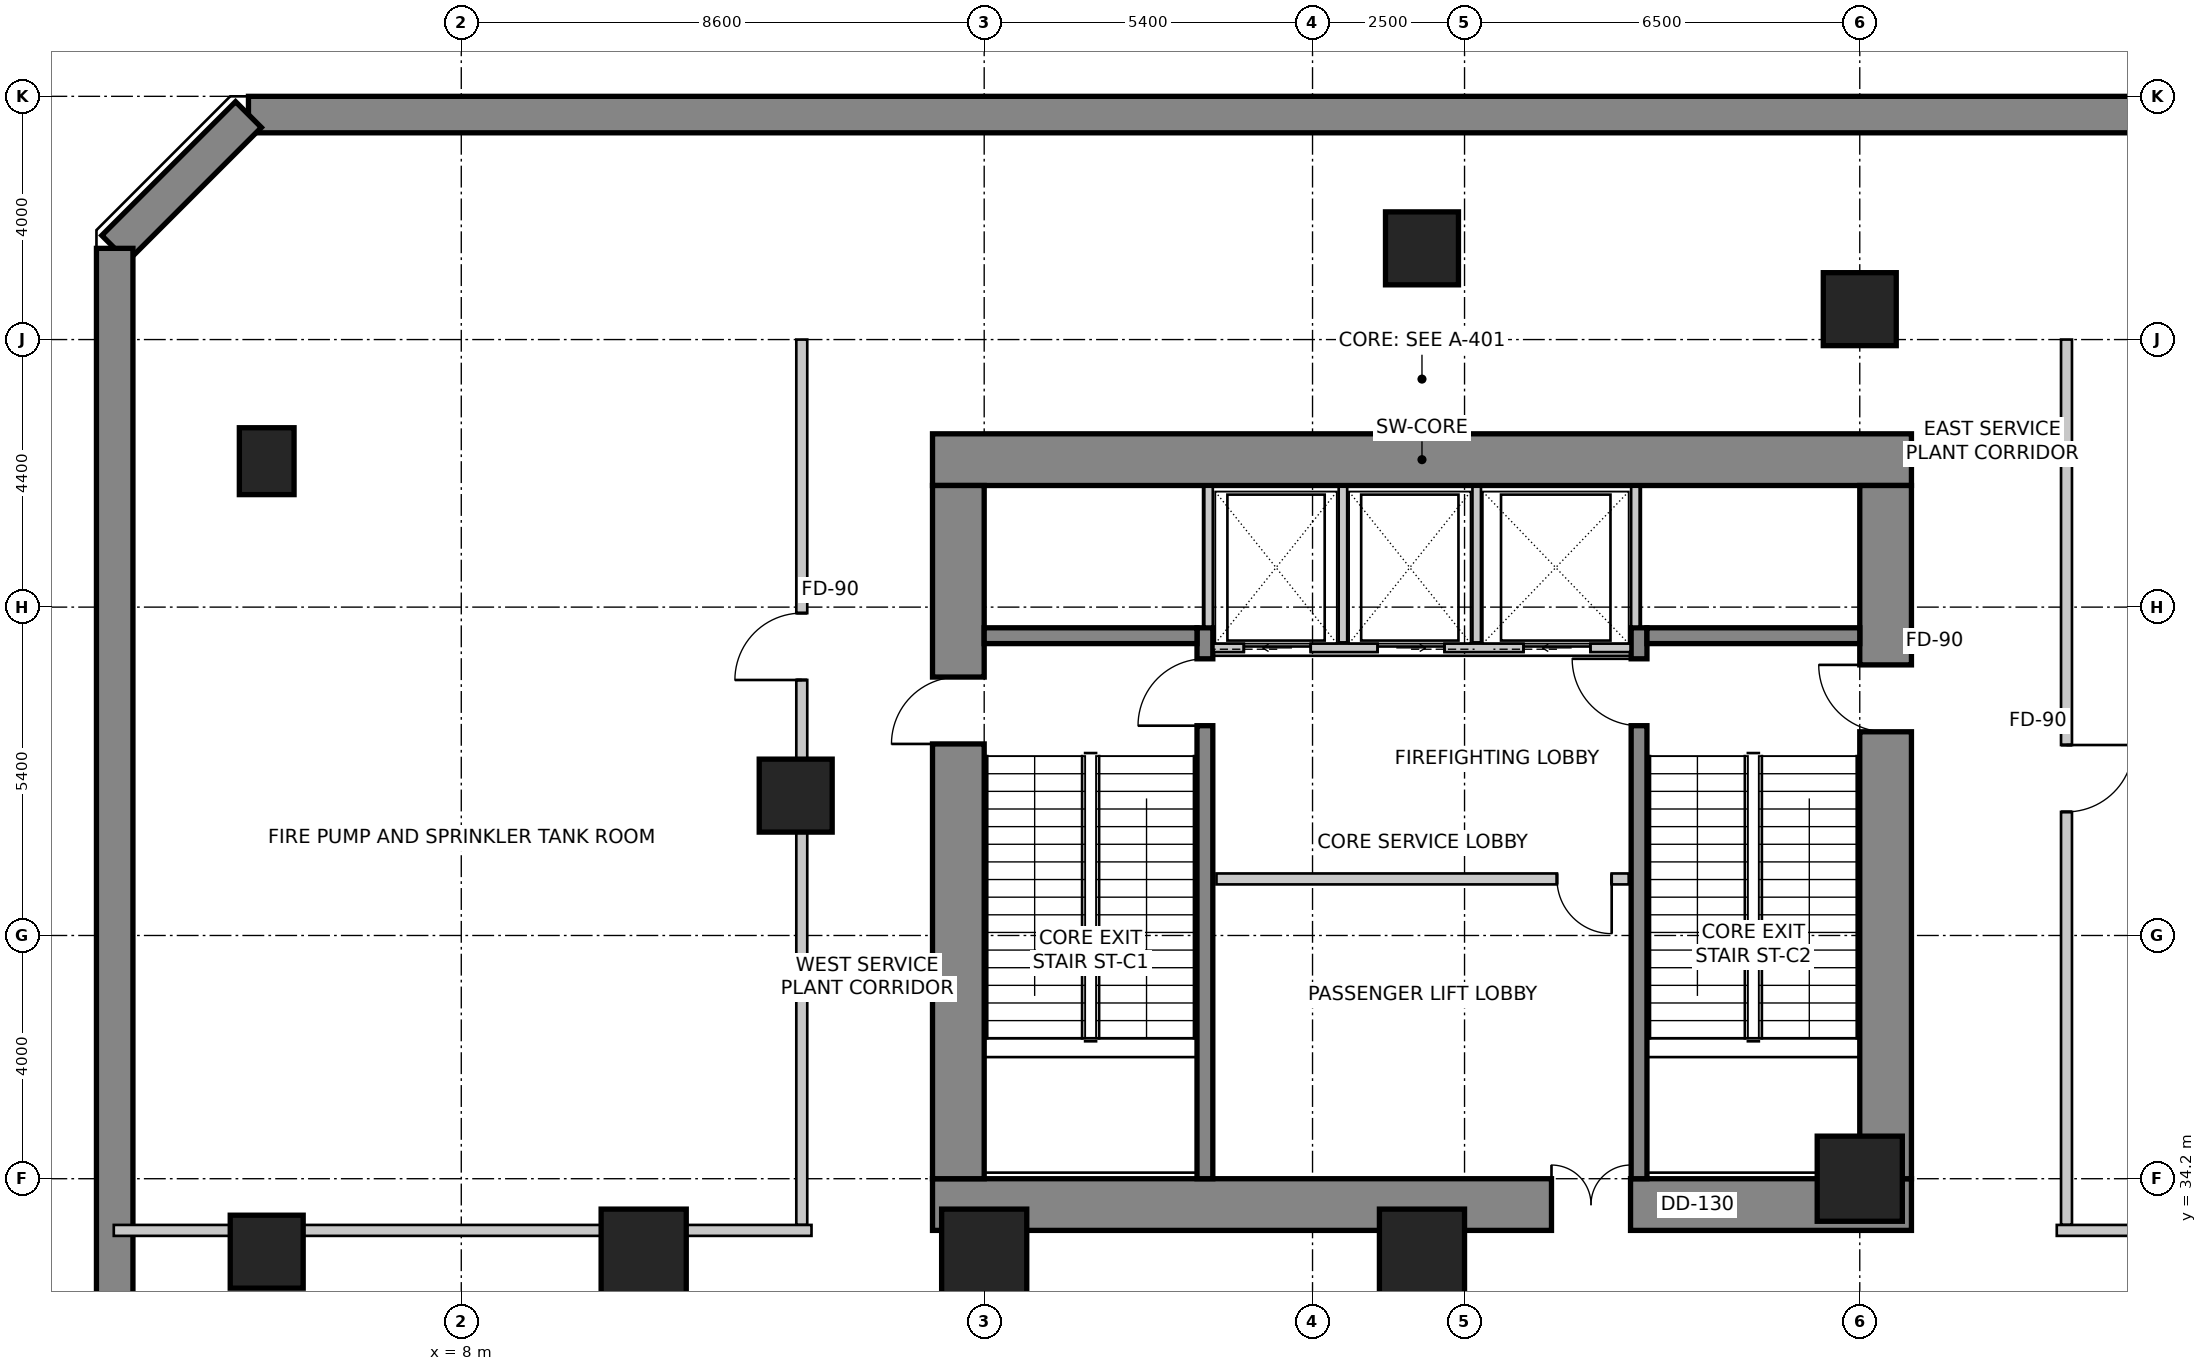
"""IFC4 building model, lengths in metres.
Left out: names, types, materials, properties, quantities, classifications, styles, units other than length and angle.
Written with IfcOpenShell. Run it as: python <this file> out.ifc"""

import sys

from ifc_helpers import new_model, si_unit, direction, frame, frame_2d, origin, origin_2d, place, context, subcontext, project, spatial, rectangle, extrude, source, transform, mapped, element, fill, save


model = new_model("IFC4")
c1 = context("Model", 3, precision=1e-05, world=origin(), true_north=direction((0.0, 1.0)))
c2 = subcontext(c1, "Body", "Model", "MODEL_VIEW")
j1 = project(units=[si_unit("LENGTHUNIT", "METRE"), si_unit("PLANEANGLEUNIT", "RADIAN")], contexts=[c1])
p1 = place(None, origin())
s1 = spatial("IfcSite", under=j1, at=p1, CompositionType="ELEMENT")
p2 = place(p1, origin())
s2 = spatial("IfcBuilding", under=s1, at=p2, CompositionType="ELEMENT")
p3 = place(p2, frame((0.0, 0.0, -11.2)))
s3 = spatial("IfcBuildingStorey", under=s2, at=p3, CompositionType="ELEMENT", Elevation=-11.2)
p4 = place(p3, frame((15.75, 46.025, 0.0), z_axis=(0.0, 0.0, 1.0), x_axis=(1.0, 0.0, 0.0)))
e1 = element("IfcWall", 1, at=p4, inside=s3, PredefinedType="SHEAR", context=c2, shape_type="SweptSolid", body=[
    extrude(rectangle(XDim=16.1, YDim=0.85, at=frame_2d((8.05, 0.0))), origin(), (0.0, 0.0, 1.0), 5.8),
])
p5 = place(p3, frame((15.75, 33.775, 0.0), z_axis=(0.0, 0.0, 1.0), x_axis=(1.0, 0.0, 0.0)))
e2 = element("IfcWall", 2, at=p5, inside=s3, PredefinedType="SHEAR", context=c2, shape_type="SweptSolid", body=[
    extrude(rectangle(XDim=16.1, YDim=0.85, at=frame_2d((8.05, 0.0))), origin(), (0.0, 0.0, 1.0), 5.8),
])
m1 = source(origin(), c2, "Body", "SweptSolid", [
    extrude(rectangle(XDim=1.3, YDim=2.15, at=frame_2d((0.65, 1.075))), frame((0.0, 0.435, 0.0), z_axis=(0.0, -1.0, 0.0), x_axis=(1.0, 0.0, 0.0)), (0.0, 0.0, 1.0), 0.87),
])
p6 = place(p5, frame((10.18, 0.0, 0.0)))
e3 = element("IfcOpeningElement", 3, at=p6, cuts=e2, PredefinedType="OPENING", context=c2, shape_type="MappedRepresentation", body=[
    mapped(m1, transform((0.0, 0.0, 0.0), scale=1.0)),
])
p7 = place(p3, frame((16.175, 34.2, 0.0), z_axis=(0.0, 0.0, 1.0), x_axis=(0.0, 1.0, 0.0)))
e4 = element("IfcWall", 4, at=p7, inside=s3, PredefinedType="SHEAR", context=c2, shape_type="SweptSolid", body=[
    extrude(rectangle(XDim=11.4, YDim=0.85, at=frame_2d((5.7, 0.0))), origin(), (0.0, 0.0, 1.0), 5.8),
])
m2 = source(origin(), c2, "Body", "SweptSolid", [
    extrude(rectangle(XDim=1.1, YDim=2.15, at=frame_2d((0.55, 1.075))), frame((0.0, 0.435, 0.0), z_axis=(0.0, -1.0, 0.0), x_axis=(1.0, 0.0, 0.0)), (0.0, 0.0, 1.0), 0.87),
])
p8 = place(p7, frame((7.15, 0.0, 0.0)))
e5 = element("IfcOpeningElement", 5, at=p8, cuts=e4, PredefinedType="OPENING", context=c2, shape_type="MappedRepresentation", body=[
    mapped(m2, transform((0.0, 0.0, 0.0), scale=1.0)),
])
p9 = place(p3, frame((31.425, 34.2, 0.0), z_axis=(0.0, 0.0, 1.0), x_axis=(0.0, 1.0, 0.0)))
e6 = element("IfcWall", 6, at=p9, inside=s3, PredefinedType="SHEAR", context=c2, shape_type="SweptSolid", body=[
    extrude(rectangle(XDim=11.4, YDim=0.85, at=frame_2d((5.7, 0.0))), origin(), (0.0, 0.0, 1.0), 5.8),
])
p10 = place(p9, frame((7.35, 0.0, 0.0)))
e7 = element("IfcOpeningElement", 7, at=p10, cuts=e6, PredefinedType="OPENING", context=c2, shape_type="MappedRepresentation", body=[
    mapped(m2, transform((0.0, 0.0, 0.0), scale=1.0)),
])
p11 = place(p3, frame((20.23, 34.2, 0.0), z_axis=(0.0, 0.0, 1.0), x_axis=(0.0, 1.0, 0.0)))
e8 = element("IfcWall", 8, at=p11, inside=s3, PredefinedType="SHEAR", context=c2, shape_type="SweptSolid", body=[
    extrude(rectangle(XDim=9.06, YDim=0.26, at=frame_2d((4.53, 0.0))), origin(), (0.0, 0.0, 1.0), 5.8),
])
m3 = source(origin(), c2, "Body", "SweptSolid", [
    extrude(rectangle(XDim=1.1, YDim=2.15, at=frame_2d((0.55, 1.075))), frame((0.0, 0.14, 0.0), z_axis=(0.0, -1.0, 0.0), x_axis=(1.0, 0.0, 0.0)), (0.0, 0.0, 1.0), 0.28),
])
p12 = place(p11, frame((7.45, 0.0, 0.0)))
e9 = element("IfcOpeningElement", 9, at=p12, cuts=e8, PredefinedType="OPENING", context=c2, shape_type="MappedRepresentation", body=[
    mapped(m3, transform((0.0, 0.0, 0.0), scale=1.0)),
])
p13 = place(p3, frame((27.37, 34.2, 0.0), z_axis=(0.0, 0.0, 1.0), x_axis=(0.0, 1.0, 0.0)))
e10 = element("IfcWall", 10, at=p13, inside=s3, PredefinedType="SHEAR", context=c2, shape_type="SweptSolid", body=[
    extrude(rectangle(XDim=9.06, YDim=0.26, at=frame_2d((4.53, 0.0))), origin(), (0.0, 0.0, 1.0), 5.8),
])
p14 = place(p13, frame((7.45, 0.0, 0.0)))
e11 = element("IfcOpeningElement", 11, at=p14, cuts=e10, PredefinedType="OPENING", context=c2, shape_type="MappedRepresentation", body=[
    mapped(m3, transform((0.0, 0.0, 0.0), scale=1.0)),
])
for number, where, z_axis, x_axis in (
    (12, (16.6, 43.13, 0.0), (0.0, 0.0, 1.0), (1.0, 0.0, 0.0)),
    (13, (27.5, 43.13, 0.0), (0.0, 0.0, 1.0), (1.0, 0.0, 0.0)),
):
    element("IfcWall", number, at=place(p3, frame(where, z_axis=z_axis, x_axis=x_axis)), inside=s3, PredefinedType="SHEAR", context=c2, shape_type="SweptSolid", body=[
        extrude(rectangle(XDim=3.5, YDim=0.26, at=frame_2d((1.75, 0.0))), origin(), (0.0, 0.0, 1.0), 5.8),
    ])
p15 = place(p3, frame((65.5, 51.7, 0.0), z_axis=(0.0, 0.0, 1.0), x_axis=(-1.0, 0.0, 0.0)))
e14 = element("IfcWall", 14, at=p15, inside=s3, PredefinedType="SHEAR", context=c2, shape_type="SweptSolid", body=[
    extrude(rectangle(XDim=61.0, YDim=0.6, at=frame_2d((30.5, 0.0))), origin(), (0.0, 0.0, 1.0), 5.8),
])
p16 = place(p3, frame((4.5, 51.7, 0.0), z_axis=(0.0, 0.0, 1.0), x_axis=(-0.707106781187, -0.707106781187, 0.0)))
e15 = element("IfcWall", 15, at=p16, inside=s3, PredefinedType="SHEAR", context=c2, shape_type="SweptSolid", body=[
    extrude(rectangle(XDim=3.111, YDim=0.6, at=frame_2d((1.556, 0.0))), origin(), (0.0, 0.0, 1.0), 5.8),
])
p17 = place(p3, frame((2.3, 49.5, 0.0), z_axis=(0.0, 0.0, 1.0), x_axis=(0.0, -1.0, 0.0)))
e16 = element("IfcWall", 16, at=p17, inside=s3, PredefinedType="SHEAR", context=c2, shape_type="SweptSolid", body=[
    extrude(rectangle(XDim=45.0, YDim=0.6, at=frame_2d((22.5, 0.0))), origin(), (0.0, 0.0, 1.0), 5.8),
])
m4 = source(origin(), c2, "Body", "SweptSolid", [
    extrude(rectangle(XDim=1.2, YDim=1.2, at=origin_2d()), origin(), (0.0, 0.0, 1.0), 5.8),
])
p18 = place(p3, frame((4.8, 33.0, 0.0), z_axis=(0.0, 0.0, 1.0), x_axis=(1.0, 0.0, 0.0)))
e17 = element("IfcColumn", 17, at=p18, inside=s3, PredefinedType="COLUMN", context=c2, shape_type="MappedRepresentation", body=[
    mapped(m4, transform((0.0, 0.0, 0.0), scale=1.0)),
])
m5 = source(origin(), c2, "Body", "SweptSolid", [
    extrude(rectangle(XDim=1.4, YDim=1.4, at=origin_2d()), origin(), (0.0, 0.0, 1.0), 5.8),
])
for number, where, z_axis, x_axis in (
    (18, (11.0, 33.0, 0.0), (0.0, 0.0, 1.0), (1.0, 0.0, 0.0)),
    (19, (16.6, 33.0, 0.0), (0.0, 0.0, 1.0), (1.0, 0.0, 0.0)),
    (20, (23.8, 33.0, 0.0), (0.0, 0.0, 1.0), (1.0, 0.0, 0.0)),
    (21, (31.0, 34.2, 0.0), (0.0, 0.0, 1.0), (1.0, 0.0, 0.0)),
):
    element("IfcColumn", number, at=place(p3, frame(where, z_axis=z_axis, x_axis=x_axis)), inside=s3, PredefinedType="COLUMN", context=c2, shape_type="MappedRepresentation", body=[
        mapped(m5, transform((0.0, 0.0, 0.0), scale=1.0)),
    ])
m6 = source(origin(), c2, "Body", "SweptSolid", [
    extrude(rectangle(XDim=0.9, YDim=1.1, at=origin_2d()), origin(), (0.0, 0.0, 1.0), 5.8),
])
p19 = place(p3, frame((4.8, 46.0, 0.0), z_axis=(0.0, 0.0, 1.0), x_axis=(1.0, 0.0, 0.0)))
e22 = element("IfcColumn", 22, at=p19, inside=s3, PredefinedType="COLUMN", context=c2, shape_type="MappedRepresentation", body=[
    mapped(m6, transform((0.0, 0.0, 0.0), scale=1.0)),
])
for number, where, z_axis, x_axis in (
    (23, (13.5, 40.5, 0.0), (0.0, 0.0, 1.0), (1.0, 0.0, 0.0)),
    (24, (23.8, 49.5, 0.0), (0.0, 0.0, 1.0), (1.0, 0.0, 0.0)),
    (25, (31.0, 48.5, 0.0), (0.0, 0.0, 1.0), (1.0, 0.0, 0.0)),
):
    element("IfcColumn", number, at=place(p3, frame(where, z_axis=z_axis, x_axis=x_axis)), inside=s3, PredefinedType="COLUMN", context=c2, shape_type="MappedRepresentation", body=[
        mapped(m4, transform((0.0, 0.0, 0.0), scale=1.0)),
    ])
p20 = place(p3, frame((20.37, 42.93, 0.0), z_axis=(0.0, 0.0, 1.0), x_axis=(1.0, 0.0, 0.0)))
e26 = element("IfcWall", 26, at=p20, inside=s3, PredefinedType="SOLIDWALL", context=c2, shape_type="SweptSolid", body=[
    extrude(rectangle(XDim=6.86, YDim=0.14, at=frame_2d((3.43, 0.0))), origin(), (0.0, 0.0, 1.0), 5.48),
])
m7 = source(origin(), c2, "Body", "SweptSolid", [
    extrude(rectangle(XDim=1.1, YDim=2.15, at=frame_2d((0.55, 1.075))), frame((0.0, 0.08, 0.0), z_axis=(0.0, -1.0, 0.0), x_axis=(1.0, 0.0, 0.0)), (0.0, 0.0, 1.0), 0.16),
])
p21 = place(p20, frame((0.5, 0.0, 0.0)))
e27 = element("IfcOpeningElement", 27, at=p21, cuts=e26, PredefinedType="OPENING", context=c2, shape_type="MappedRepresentation", body=[
    mapped(m7, transform((0.0, 0.0, 0.0), scale=1.0)),
])
p22 = place(p20, frame((2.7, 0.0, 0.0)))
e28 = element("IfcOpeningElement", 28, at=p22, cuts=e26, PredefinedType="OPENING", context=c2, shape_type="MappedRepresentation", body=[
    mapped(m7, transform((0.0, 0.0, 0.0), scale=1.0)),
])
p23 = place(p20, frame((5.1, 0.0, 0.0)))
e29 = element("IfcOpeningElement", 29, at=p23, cuts=e26, PredefinedType="OPENING", context=c2, shape_type="MappedRepresentation", body=[
    mapped(m7, transform((0.0, 0.0, 0.0), scale=1.0)),
])
for number, where, z_axis, x_axis in (
    (30, (20.29, 43.28, 0.0), (0.0, 0.0, 1.0), (0.0, 1.0, 0.0)),
    (31, (27.31, 43.28, 0.0), (0.0, 0.0, 1.0), (0.0, 1.0, 0.0)),
):
    element("IfcWall", number, at=place(p3, frame(where, z_axis=z_axis, x_axis=x_axis)), inside=s3, PredefinedType="SOLIDWALL", context=c2, shape_type="SweptSolid", body=[
        extrude(rectangle(XDim=2.3, YDim=0.14, at=frame_2d((1.15, 0.0))), origin(), (0.0, 0.0, 1.0), 5.48),
    ])
for number, where, z_axis, x_axis in (
    (32, (22.5, 43.02, 0.0), (0.0, 0.0, 1.0), (0.0, 1.0, 0.0)),
    (33, (24.7, 43.02, 0.0), (0.0, 0.0, 1.0), (0.0, 1.0, 0.0)),
):
    element("IfcWall", number, at=place(p3, frame(where, z_axis=z_axis, x_axis=x_axis)), inside=s3, PredefinedType="SOLIDWALL", context=c2, shape_type="SweptSolid", body=[
        extrude(rectangle(XDim=2.56, YDim=0.14, at=frame_2d((1.28, 0.0))), origin(), (0.0, 0.0, 1.0), 5.48),
    ])
p24 = place(p3, frame((27.2, 39.13, 0.0), z_axis=(0.0, 0.0, 1.0), x_axis=(-1.0, 0.0, 0.0)))
e34 = element("IfcWall", 34, at=p24, inside=s3, PredefinedType="PARTITIONING", context=c2, shape_type="SweptSolid", body=[
    extrude(rectangle(XDim=6.78, YDim=0.18, at=frame_2d((3.39, 0.0))), origin(), (0.0, 0.0, 1.0), 5.48),
])
m8 = source(origin(), c2, "Body", "SweptSolid", [
    extrude(rectangle(XDim=0.9, YDim=2.15, at=frame_2d((0.45, 1.075))), frame((0.0, 0.1, 0.0), z_axis=(0.0, -1.0, 0.0), x_axis=(1.0, 0.0, 0.0)), (0.0, 0.0, 1.0), 0.2),
])
p25 = place(p24, frame((0.28, 0.0, 0.0)))
e35 = element("IfcOpeningElement", 35, at=p25, cuts=e34, PredefinedType="OPENING", context=c2, shape_type="MappedRepresentation", body=[
    mapped(m8, transform((0.0, 0.0, 0.0), scale=1.0)),
])
p26 = place(p3, frame((34.24, 33.35, 0.0), z_axis=(0.0, 0.0, 1.0), x_axis=(1.0, 0.0, 0.0)))
e36 = element("IfcWall", 36, at=p26, inside=s3, PredefinedType="PARTITIONING", context=c2, shape_type="SweptSolid", body=[
    extrude(rectangle(XDim=13.42, YDim=0.18, at=frame_2d((6.71, 0.0))), origin(), (0.0, 0.0, 1.0), 3.672),
])
p27 = place(p3, frame((2.285, 33.35, 0.0), z_axis=(0.0, 0.0, 1.0), x_axis=(1.0, 0.0, 0.0)))
e37 = element("IfcWall", 37, at=p27, inside=s3, PredefinedType="PARTITIONING", context=c2, shape_type="SweptSolid", body=[
    extrude(rectangle(XDim=11.475, YDim=0.18, at=frame_2d((5.738, 0.0))), origin(), (0.0, 0.0, 1.0), 4.272),
])
p28 = place(p3, frame((13.6, 33.444, 0.0), z_axis=(0.0, 0.0, 1.0), x_axis=(0.0, 1.0, 0.0)))
e38 = element("IfcWall", 38, at=p28, inside=s3, PredefinedType="PARTITIONING", context=c2, shape_type="SweptSolid", body=[
    extrude(rectangle(XDim=14.556, YDim=0.18, at=frame_2d((7.278, 0.0))), origin(), (0.0, 0.0, 1.0), 4.522),
])
m9 = source(origin(), c2, "Body", "SweptSolid", [
    extrude(rectangle(XDim=1.1, YDim=2.15, at=frame_2d((0.55, 1.075))), frame((0.0, 0.1, 0.0), z_axis=(0.0, -1.0, 0.0), x_axis=(1.0, 0.0, 0.0)), (0.0, 0.0, 1.0), 0.2),
])
p29 = place(p28, frame((8.958, 0.0, 0.0)))
e39 = element("IfcOpeningElement", 39, at=p29, cuts=e38, PredefinedType="OPENING", context=c2, shape_type="MappedRepresentation", body=[
    mapped(m9, transform((0.0, 0.0, 0.0), scale=1.0)),
])
p30 = place(p3, frame((34.4, 48.0, 0.0), z_axis=(0.0, 0.0, 1.0), x_axis=(0.0, -1.0, 0.0)))
e40 = element("IfcWall", 40, at=p30, inside=s3, PredefinedType="PARTITIONING", context=c2, shape_type="SweptSolid", body=[
    extrude(rectangle(XDim=14.556, YDim=0.18, at=frame_2d((7.278, 0.0))), origin(), (0.0, 0.0, 1.0), 4.522),
])
p31 = place(p30, frame((6.668, 0.0, 0.0)))
e41 = element("IfcOpeningElement", 41, at=p31, cuts=e40, PredefinedType="OPENING", context=c2, shape_type="MappedRepresentation", body=[
    mapped(m9, transform((0.0, 0.0, 0.0), scale=1.0)),
])
m10 = source(origin(), c2, "Body", "SweptSolid", [
    extrude(rectangle(XDim=1.1, YDim=2.15, at=frame_2d((0.55, 1.075))), frame((0.0, 0.025, 0.0), z_axis=(0.0, -1.0, 0.0), x_axis=(1.0, 0.0, 0.0)), (0.0, 0.0, 1.0), 0.05),
])
p32 = place(p21, origin())
e42 = element("IfcDoor", 42, at=p32, inside=s3, OperationType="SLIDING_TO_LEFT", PredefinedType="DOOR", context=c2, shape_type="MappedRepresentation", body=[
    mapped(m10, transform((0.0, 0.0, 0.0), scale=1.0)),
])
fill(e27, e42)
p33 = place(p22, origin())
e43 = element("IfcDoor", 43, at=p33, inside=s3, OperationType="SLIDING_TO_RIGHT", PredefinedType="DOOR", context=c2, shape_type="MappedRepresentation", body=[
    mapped(m10, transform((0.0, 0.0, 0.0), scale=1.0)),
])
fill(e28, e43)
m11 = source(origin(), c2, "Body", "SweptSolid", [
    extrude(rectangle(XDim=1.1, YDim=2.15, at=frame_2d((0.55, 1.075))), frame((0.0, 0.025, 0.0), z_axis=(0.0, -1.0, 0.0), x_axis=(1.0, 0.0, 0.0)), (0.0, 0.0, 1.0), 0.05),
])
p34 = place(p23, origin())
e44 = element("IfcDoor", 44, at=p34, inside=s3, OperationType="SLIDING_TO_LEFT", PredefinedType="DOOR", context=c2, shape_type="MappedRepresentation", body=[
    mapped(m11, transform((0.0, 0.0, 0.0), scale=1.0)),
])
fill(e29, e44)
m12 = source(origin(), c2, "Body", "SweptSolid", [
    extrude(rectangle(XDim=1.1, YDim=2.15, at=frame_2d((0.55, 1.075))), frame((0.0, 0.025, 0.0), z_axis=(0.0, -1.0, 0.0), x_axis=(1.0, 0.0, 0.0)), (0.0, 0.0, 1.0), 0.05),
])
p35 = place(p12, origin())
e45 = element("IfcDoor", 45, at=p35, inside=s3, OperationType="SINGLE_SWING_LEFT", PredefinedType="DOOR", context=c2, shape_type="MappedRepresentation", body=[
    mapped(m12, transform((0.0, 0.0, 0.0), scale=1.0)),
])
fill(e9, e45)
p36 = place(p14, origin())
e46 = element("IfcDoor", 46, at=p36, inside=s3, OperationType="SINGLE_SWING_RIGHT", PredefinedType="DOOR", context=c2, shape_type="MappedRepresentation", body=[
    mapped(m12, transform((0.0, 0.0, 0.0), scale=1.0)),
])
fill(e11, e46)
p37 = place(p8, origin())
e47 = element("IfcDoor", 47, at=p37, inside=s3, OperationType="SINGLE_SWING_LEFT", PredefinedType="DOOR", context=c2, shape_type="MappedRepresentation", body=[
    mapped(m12, transform((0.0, 0.0, 0.0), scale=1.0)),
])
fill(e5, e47)
p38 = place(p10, origin())
e48 = element("IfcDoor", 48, at=p38, inside=s3, OperationType="SINGLE_SWING_RIGHT", PredefinedType="DOOR", context=c2, shape_type="MappedRepresentation", body=[
    mapped(m12, transform((0.0, 0.0, 0.0), scale=1.0)),
])
fill(e7, e48)
m13 = source(origin(), c2, "Body", "SweptSolid", [
    extrude(rectangle(XDim=1.3, YDim=2.15, at=frame_2d((0.65, 1.075))), frame((0.0, 0.025, 0.0), z_axis=(0.0, -1.0, 0.0), x_axis=(1.0, 0.0, 0.0)), (0.0, 0.0, 1.0), 0.05),
])
p39 = place(p6, origin())
e49 = element("IfcDoor", 49, at=p39, inside=s3, OperationType="DOUBLE_DOOR_SINGLE_SWING", PredefinedType="DOOR", context=c2, shape_type="MappedRepresentation", body=[
    mapped(m13, transform((0.0, 0.0, 0.0), scale=1.0)),
])
fill(e3, e49)
m14 = source(origin(), c2, "Body", "SweptSolid", [
    extrude(rectangle(XDim=0.9, YDim=2.15, at=frame_2d((0.45, 1.075))), frame((0.0, 0.025, 0.0), z_axis=(0.0, -1.0, 0.0), x_axis=(1.0, 0.0, 0.0)), (0.0, 0.0, 1.0), 0.05),
])
p40 = place(p25, origin())
e50 = element("IfcDoor", 50, at=p40, inside=s3, OperationType="SINGLE_SWING_LEFT", PredefinedType="DOOR", context=c2, shape_type="MappedRepresentation", body=[
    mapped(m14, transform((0.0, 0.0, 0.0), scale=1.0)),
])
fill(e35, e50)
p41 = place(p31, origin())
e51 = element("IfcDoor", 51, at=p41, inside=s3, OperationType="SINGLE_SWING_LEFT", PredefinedType="DOOR", context=c2, shape_type="MappedRepresentation", body=[
    mapped(m12, transform((0.0, 0.0, 0.0), scale=1.0)),
])
fill(e41, e51)
p42 = place(p29, origin())
e52 = element("IfcDoor", 52, at=p42, inside=s3, OperationType="SINGLE_SWING_LEFT", PredefinedType="DOOR", context=c2, shape_type="MappedRepresentation", body=[
    mapped(m12, transform((0.0, 0.0, 0.0), scale=1.0)),
])
fill(e39, e52)
save(model, sys.argv[1])
